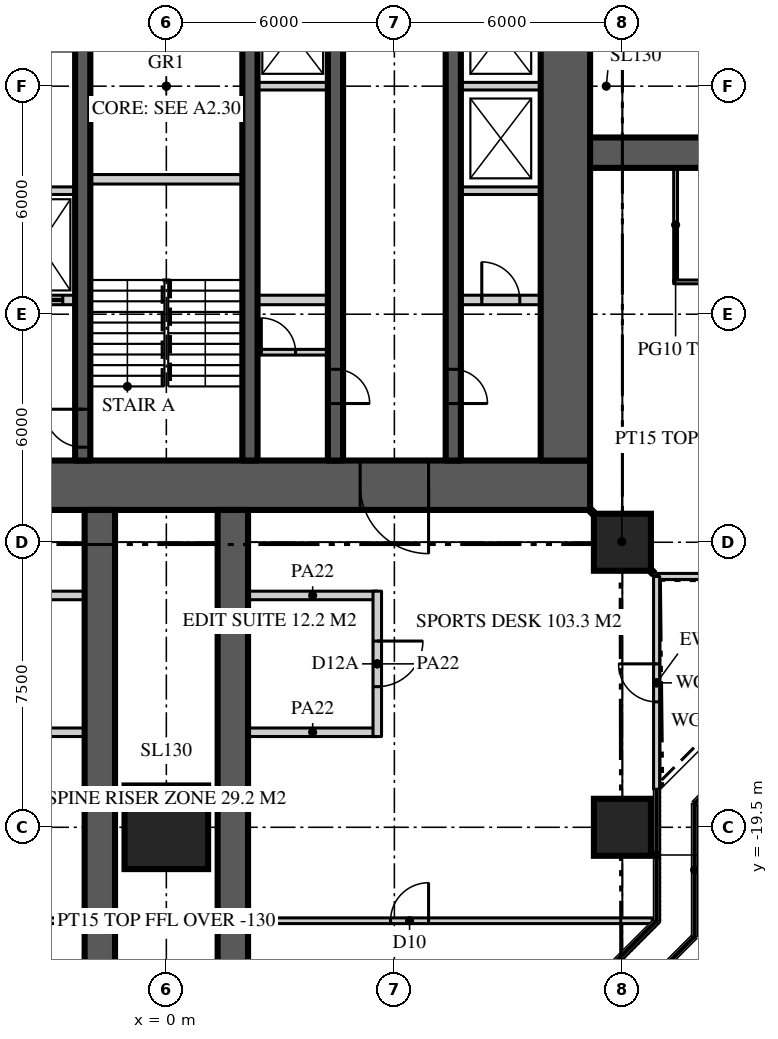
"""IFC4 building model, lengths in metres.
Left out: names, types, materials, properties, quantities, classifications, styles, units other than length and angle.
Written with IfcOpenShell. Run it as: python <this file> out.ifc"""

import sys

from ifc_helpers import new_model, si_unit, direction, frame, frame_2d, origin, origin_2d, place, context, subcontext, project, spatial, rectangle, extrude, element, fill, save


model = new_model("IFC4")
c1 = context("Model", 3, precision=1e-05, world=origin(), true_north=direction((0.0, 1.0)))
c2 = subcontext(c1, "Body", "Model", "MODEL_VIEW")
j1 = project(units=[si_unit("LENGTHUNIT", "METRE"), si_unit("PLANEANGLEUNIT", "RADIAN")], contexts=[c1])
p1 = place(None, origin())
s1 = spatial("IfcSite", under=j1, at=p1, CompositionType="ELEMENT")
p2 = place(p1, origin())
s2 = spatial("IfcBuilding", under=s1, at=p2, CompositionType="ELEMENT")
p3 = place(p2, frame((0.0, 0.0, 224.4)))
s3 = spatial("IfcBuildingStorey", under=s2, at=p3, CompositionType="ELEMENT", Elevation=224.4)
p4 = place(p3, frame((11.15, -10.5, 0.0), z_axis=(0.0, 0.0, 1.0), x_axis=(-1.0, 0.0, 0.0)))
e1 = element("IfcWall", 1, at=p4, inside=s3, PredefinedType="SHEAR", context=c2, shape_type="SweptSolid", body=[
    extrude(rectangle(XDim=22.3, YDim=1.3, at=frame_2d((11.15, 0.0))), origin(), (0.0, 0.0, 1.0), 3.9),
])
p5 = place(p4, frame((16.25, 0.0, 0.0)))
e2 = element("IfcOpeningElement", 2, at=p5, cuts=e1, PredefinedType="OPENING", context=c2, shape_type="SweptSolid", body=[
    extrude(rectangle(XDim=1.8, YDim=2.2, at=frame_2d((0.9, 1.1))), frame((0.0, 0.66, 0.0), z_axis=(0.0, -1.0, 0.0), x_axis=(1.0, 0.0, 0.0)), (0.0, 0.0, 1.0), 1.32),
])
p6 = place(p4, frame((4.25, 0.0, 0.0)))
e3 = element("IfcOpeningElement", 3, at=p6, cuts=e1, PredefinedType="OPENING", context=c2, shape_type="SweptSolid", body=[
    extrude(rectangle(XDim=1.8, YDim=2.2, at=frame_2d((0.9, 1.1))), frame((0.0, 0.66, 0.0), z_axis=(0.0, -1.0, 0.0), x_axis=(1.0, 0.0, 0.0)), (0.0, 0.0, 1.0), 1.32),
])
p7 = place(p3, frame((10.5, -9.85, 0.0), z_axis=(0.0, 0.0, 1.0), x_axis=(0.0, 1.0, 0.0)))
e4 = element("IfcWall", 4, at=p7, inside=s3, PredefinedType="SHEAR", context=c2, shape_type="SweptSolid", body=[
    extrude(rectangle(XDim=19.7, YDim=1.3, at=frame_2d((9.85, 0.0))), origin(), (0.0, 0.0, 1.0), 3.9),
])
p8 = place(p7, frame((17.25, 0.0, 0.0)))
e5 = element("IfcOpeningElement", 5, at=p8, cuts=e4, PredefinedType="OPENING", context=c2, shape_type="SweptSolid", body=[
    extrude(rectangle(XDim=1.0, YDim=2.2, at=frame_2d((0.5, 1.1))), frame((0.0, 0.66, 0.0), z_axis=(0.0, -1.0, 0.0), x_axis=(1.0, 0.0, 0.0)), (0.0, 0.0, 1.0), 1.32),
])
for number, where, z_axis, x_axis in (
    (6, (11.15, -1.75, 0.0), (0.0, 0.0, 1.0), (1.0, 0.0, 0.0)),
    (7, (-1.75, -11.15, 0.0), (0.0, 0.0, 1.0), (0.0, -1.0, 0.0)),
    (8, (1.75, -11.15, 0.0), (0.0, 0.0, 1.0), (0.0, -1.0, 0.0)),
):
    element("IfcWall", number, at=place(p3, frame(where, z_axis=z_axis, x_axis=x_axis)), inside=s3, PredefinedType="SHEAR", context=c2, shape_type="SweptSolid", body=[
        extrude(rectangle(XDim=15.25, YDim=0.8, at=frame_2d((7.625, 0.0))), origin(), (0.0, 0.0, 1.0), 3.9),
    ])
p9 = place(p3, frame((0.0, -19.5, 0.0), z_axis=(0.0, 0.0, 1.0), x_axis=(1.0, 0.0, 0.0)))
e9 = element("IfcColumn", 9, at=p9, inside=s3, PredefinedType="COLUMN", context=c2, shape_type="SweptSolid", body=[
    extrude(rectangle(XDim=2.2, YDim=2.2, at=origin_2d()), origin(), (0.0, 0.0, 1.0), 3.9),
])
for number, where, z_axis, x_axis in (
    (10, (12.0, -19.5, 0.0), (0.0, 0.0, 1.0), (1.0, 0.0, 0.0)),
    (11, (12.0, -12.0, 0.0), (0.0, 0.0, 1.0), (1.0, 0.0, 0.0)),
):
    element("IfcColumn", number, at=place(p3, frame(where, z_axis=z_axis, x_axis=x_axis)), inside=s3, PredefinedType="COLUMN", context=c2, shape_type="SweptSolid", body=[
        extrude(rectangle(XDim=1.5, YDim=1.5, at=origin_2d()), origin(), (0.0, 0.0, 1.0), 3.9),
    ])
p10 = place(p3, frame((12.9, -12.9, 0.0), z_axis=(0.0, 0.0, 1.0), x_axis=(1.0, 0.0, 0.0)))
e12 = element("IfcWall", 12, at=p10, inside=s3, PredefinedType="SOLIDWALL", context=c2, shape_type="SweptSolid", body=[
    extrude(rectangle(XDim=5.6, YDim=0.16, at=frame_2d((2.8, 0.0))), origin(), (0.0, 0.0, 1.0), 3.77),
])
p11 = place(p3, frame((12.9, -18.5, 0.0), z_axis=(0.0, 0.0, 1.0), x_axis=(0.0, 1.0, 0.0)))
e13 = element("IfcWall", 13, at=p11, inside=s3, PredefinedType="SOLIDWALL", context=c2, shape_type="SweptSolid", body=[
    extrude(rectangle(XDim=5.6, YDim=0.16, at=frame_2d((2.8, 0.0))), origin(), (0.0, 0.0, 1.0), 3.77),
])
p12 = place(p11, frame((2.3, 0.0, 0.0)))
e14 = element("IfcOpeningElement", 14, at=p12, cuts=e13, PredefinedType="OPENING", context=c2, shape_type="SweptSolid", body=[
    extrude(rectangle(XDim=1.0, YDim=2.2, at=frame_2d((0.5, 1.1))), frame((0.0, 0.09, 0.0), z_axis=(0.0, -1.0, 0.0), x_axis=(1.0, 0.0, 0.0)), (0.0, 0.0, 1.0), 0.18),
])
p13 = place(p3, frame((7.55, 9.85, 0.0), z_axis=(0.0, 0.0, 1.0), x_axis=(0.0, -1.0, 0.0)))
e15 = element("IfcWall", 15, at=p13, inside=s3, PredefinedType="SHEAR", context=c2, shape_type="SweptSolid", body=[
    extrude(rectangle(XDim=19.7, YDim=0.4, at=frame_2d((9.85, 0.0))), origin(), (0.0, 0.0, 1.0), 3.9),
])
p14 = place(p13, frame((1.45, 0.0, 0.0)))
e16 = element("IfcOpeningElement", 16, at=p14, cuts=e15, PredefinedType="OPENING", context=c2, shape_type="SweptSolid", body=[
    extrude(rectangle(XDim=1.0, YDim=2.2, at=frame_2d((0.5, 1.1))), frame((0.0, 0.21, 0.0), z_axis=(0.0, -1.0, 0.0), x_axis=(1.0, 0.0, 0.0)), (0.0, 0.0, 1.0), 0.42),
])
p15 = place(p13, frame((17.3, 0.0, 0.0)))
e17 = element("IfcOpeningElement", 17, at=p15, cuts=e15, PredefinedType="OPENING", context=c2, shape_type="SweptSolid", body=[
    extrude(rectangle(XDim=0.9, YDim=2.1, at=frame_2d((0.45, 1.05))), frame((0.0, 0.21, 0.0), z_axis=(0.0, -1.0, 0.0), x_axis=(1.0, 0.0, 0.0)), (0.0, 0.0, 1.0), 0.42),
])
p16 = place(p3, frame((4.45, 9.85, 0.0), z_axis=(0.0, 0.0, 1.0), x_axis=(0.0, -1.0, 0.0)))
e18 = element("IfcWall", 18, at=p16, inside=s3, PredefinedType="SHEAR", context=c2, shape_type="SweptSolid", body=[
    extrude(rectangle(XDim=19.7, YDim=0.4, at=frame_2d((9.85, 0.0))), origin(), (0.0, 0.0, 1.0), 3.9),
])
p17 = place(p16, frame((1.95, 0.0, 0.0)))
e19 = element("IfcOpeningElement", 19, at=p17, cuts=e18, PredefinedType="OPENING", context=c2, shape_type="SweptSolid", body=[
    extrude(rectangle(XDim=1.0, YDim=2.2, at=frame_2d((0.5, 1.1))), frame((0.0, 0.21, 0.0), z_axis=(0.0, -1.0, 0.0), x_axis=(1.0, 0.0, 0.0)), (0.0, 0.0, 1.0), 0.42),
])
p18 = place(p16, frame((17.3, 0.0, 0.0)))
e20 = element("IfcOpeningElement", 20, at=p18, cuts=e18, PredefinedType="OPENING", context=c2, shape_type="SweptSolid", body=[
    extrude(rectangle(XDim=0.9, YDim=2.1, at=frame_2d((0.45, 1.05))), frame((0.0, 0.21, 0.0), z_axis=(0.0, -1.0, 0.0), x_axis=(1.0, 0.0, 0.0)), (0.0, 0.0, 1.0), 0.42),
])
p19 = place(p3, frame((-2.2, -9.85, 0.0), z_axis=(0.0, 0.0, 1.0), x_axis=(0.0, 1.0, 0.0)))
e21 = element("IfcWall", 21, at=p19, inside=s3, PredefinedType="SHEAR", context=c2, shape_type="SweptSolid", body=[
    extrude(rectangle(XDim=19.7, YDim=0.4, at=frame_2d((9.85, 0.0))), origin(), (0.0, 0.0, 1.0), 3.9),
])
p20 = place(p19, frame((0.35, 0.0, 0.0)))
e22 = element("IfcOpeningElement", 22, at=p20, cuts=e21, PredefinedType="OPENING", context=c2, shape_type="SweptSolid", body=[
    extrude(rectangle(XDim=1.0, YDim=2.2, at=frame_2d((0.5, 1.1))), frame((0.0, 0.21, 0.0), z_axis=(0.0, -1.0, 0.0), x_axis=(1.0, 0.0, 0.0)), (0.0, 0.0, 1.0), 0.42),
])
p21 = place(p3, frame((2.2, 9.85, 0.0), z_axis=(0.0, 0.0, 1.0), x_axis=(0.0, -1.0, 0.0)))
e23 = element("IfcWall", 23, at=p21, inside=s3, PredefinedType="SHEAR", context=c2, shape_type="SweptSolid", body=[
    extrude(rectangle(XDim=19.7, YDim=0.4, at=frame_2d((9.85, 0.0))), origin(), (0.0, 0.0, 1.0), 3.9),
])
p22 = place(p21, frame((0.35, 0.0, 0.0)))
e24 = element("IfcOpeningElement", 24, at=p22, cuts=e23, PredefinedType="OPENING", context=c2, shape_type="SweptSolid", body=[
    extrude(rectangle(XDim=1.0, YDim=2.2, at=frame_2d((0.5, 1.1))), frame((0.0, 0.21, 0.0), z_axis=(0.0, -1.0, 0.0), x_axis=(1.0, 0.0, 0.0)), (0.0, 0.0, 1.0), 0.42),
])
p23 = place(p3, frame((-4.25, -5.625, 0.0), z_axis=(0.0, 0.0, 1.0), x_axis=(1.0, 0.0, 0.0)))
e25 = element("IfcWall", 25, at=p23, inside=s3, PredefinedType="SOLIDWALL", context=c2, shape_type="SweptSolid", body=[
    extrude(rectangle(XDim=1.85, YDim=0.25, at=frame_2d((0.925, 0.0))), origin(), (0.0, 0.0, 1.0), 3.7),
])
p24 = place(p23, frame((0.325, 0.0, 0.0)))
e26 = element("IfcOpeningElement", 26, at=p24, cuts=e25, PredefinedType="OPENING", context=c2, shape_type="SweptSolid", body=[
    extrude(rectangle(XDim=1.2, YDim=2.2, at=frame_2d((0.6, 1.1))), frame((0.0, 0.135, 0.0), z_axis=(0.0, -1.0, 0.0), x_axis=(1.0, 0.0, 0.0)), (0.0, 0.0, 1.0), 0.27),
])
p25 = place(p3, frame((2.4, -5.625, 0.0), z_axis=(0.0, 0.0, 1.0), x_axis=(1.0, 0.0, 0.0)))
e27 = element("IfcWall", 27, at=p25, inside=s3, PredefinedType="SOLIDWALL", context=c2, shape_type="SweptSolid", body=[
    extrude(rectangle(XDim=1.85, YDim=0.25, at=frame_2d((0.925, 0.0))), origin(), (0.0, 0.0, 1.0), 3.7),
])
p26 = place(p3, frame((7.75, -5.625, 0.0), z_axis=(0.0, 0.0, 1.0), x_axis=(1.0, 0.0, 0.0)))
e28 = element("IfcWall", 28, at=p26, inside=s3, PredefinedType="SOLIDWALL", context=c2, shape_type="SweptSolid", body=[
    extrude(rectangle(XDim=2.1, YDim=0.25, at=frame_2d((1.05, 0.0))), origin(), (0.0, 0.0, 1.0), 3.7),
])
p27 = place(p26, frame((0.55, 0.0, 0.0)))
e29 = element("IfcOpeningElement", 29, at=p27, cuts=e28, PredefinedType="OPENING", context=c2, shape_type="SweptSolid", body=[
    extrude(rectangle(XDim=1.0, YDim=2.2, at=frame_2d((0.5, 1.1))), frame((0.0, 0.135, 0.0), z_axis=(0.0, -1.0, 0.0), x_axis=(1.0, 0.0, 0.0)), (0.0, 0.0, 1.0), 0.27),
])
p28 = place(p3, frame((-2.0, -2.45, 0.0), z_axis=(0.0, 0.0, 1.0), x_axis=(1.0, 0.0, 0.0)))
e30 = element("IfcWall", 30, at=p28, inside=s3, PredefinedType="SOLIDWALL", context=c2, shape_type="SweptSolid", body=[
    extrude(rectangle(XDim=4.0, YDim=0.25, at=frame_2d((2.0, 0.0))), origin(), (0.0, 0.0, 1.0), 3.7),
])
p29 = place(p3, frame((-4.25, -2.75, 0.0), z_axis=(0.0, 0.0, 1.0), x_axis=(1.0, 0.0, 0.0)))
e31 = element("IfcWall", 31, at=p29, inside=s3, PredefinedType="SOLIDWALL", context=c2, shape_type="SweptSolid", body=[
    extrude(rectangle(XDim=1.85, YDim=0.2, at=frame_2d((0.925, 0.0))), origin(), (0.0, 0.0, 1.0), 3.7),
])
p30 = place(p3, frame((7.75, -2.75, 0.0), z_axis=(0.0, 0.0, 1.0), x_axis=(1.0, 0.0, 0.0)))
e32 = element("IfcWall", 32, at=p30, inside=s3, PredefinedType="SOLIDWALL", context=c2, shape_type="SweptSolid", body=[
    extrude(rectangle(XDim=2.1, YDim=0.2, at=frame_2d((1.05, 0.0))), origin(), (0.0, 0.0, 1.0), 3.7),
])
p31 = place(p3, frame((2.4, 0.0, 0.0), z_axis=(0.0, 0.0, 1.0), x_axis=(1.0, 0.0, 0.0)))
e33 = element("IfcWall", 33, at=p31, inside=s3, PredefinedType="SOLIDWALL", context=c2, shape_type="SweptSolid", body=[
    extrude(rectangle(XDim=1.85, YDim=0.2, at=frame_2d((0.925, 0.0))), origin(), (0.0, 0.0, 1.0), 3.7),
])
p32 = place(p3, frame((7.75, 0.0, 0.0), z_axis=(0.0, 0.0, 1.0), x_axis=(1.0, 0.0, 0.0)))
e34 = element("IfcWall", 34, at=p32, inside=s3, PredefinedType="SOLIDWALL", context=c2, shape_type="SweptSolid", body=[
    extrude(rectangle(XDim=2.1, YDim=0.2, at=frame_2d((1.05, 0.0))), origin(), (0.0, 0.0, 1.0), 3.7),
])
p33 = place(p3, frame((13.4, -2.15, 0.0), z_axis=(0.0, 0.0, 1.0), x_axis=(0.0, -1.0, 0.0)))
e35 = element("IfcWall", 35, at=p33, inside=s3, PredefinedType="PARTITIONING", context=c2, shape_type="SweptSolid", body=[
    extrude(rectangle(XDim=3.0, YDim=0.1, at=frame_2d((1.5, 0.0))), origin(), (0.0, 0.0, 1.0), 3.77),
])
p34 = place(p3, frame((13.35, -5.15, 0.0), z_axis=(0.0, 0.0, 1.0), x_axis=(1.0, 0.0, 0.0)))
e36 = element("IfcWall", 36, at=p34, inside=s3, PredefinedType="PARTITIONING", context=c2, shape_type="SweptSolid", body=[
    extrude(rectangle(XDim=3.1, YDim=0.1, at=frame_2d((1.55, 0.0))), origin(), (0.0, 0.0, 1.0), 3.77),
])
p35 = place(p34, frame((1.05, 0.0, 0.0)))
e37 = element("IfcOpeningElement", 37, at=p35, cuts=e36, PredefinedType="OPENING", context=c2, shape_type="SweptSolid", body=[
    extrude(rectangle(XDim=1.0, YDim=2.2, at=frame_2d((0.5, 1.1))), frame((0.0, 0.06, 0.0), z_axis=(0.0, -1.0, 0.0), x_axis=(1.0, 0.0, 0.0)), (0.0, 0.0, 1.0), 0.12),
])
p36 = place(p3, frame((-12.786, -21.959, 0.0), z_axis=(0.0, 0.0, 1.0), x_axis=(1.0, 0.0, 0.0)))
e38 = element("IfcWall", 38, at=p36, inside=s3, PredefinedType="PARTITIONING", context=c2, shape_type="SweptSolid", body=[
    extrude(rectangle(XDim=25.573, YDim=0.15, at=frame_2d((12.786, 0.0))), origin(), (0.0, 0.0, 1.0), 3.77),
])
p37 = place(p36, frame((18.687, 0.0, 0.0)))
e39 = element("IfcOpeningElement", 39, at=p37, cuts=e38, PredefinedType="OPENING", context=c2, shape_type="SweptSolid", body=[
    extrude(rectangle(XDim=1.0, YDim=2.2, at=frame_2d((0.5, 1.1))), frame((0.0, 0.085, 0.0), z_axis=(0.0, -1.0, 0.0), x_axis=(1.0, 0.0, 0.0)), (0.0, 0.0, 1.0), 0.17),
])
p38 = place(p36, frame((5.886, 0.0, 0.0)))
e40 = element("IfcOpeningElement", 40, at=p38, cuts=e38, PredefinedType="OPENING", context=c2, shape_type="SweptSolid", body=[
    extrude(rectangle(XDim=1.0, YDim=2.2, at=frame_2d((0.5, 1.1))), frame((0.0, 0.085, 0.0), z_axis=(0.0, -1.0, 0.0), x_axis=(1.0, 0.0, 0.0)), (0.0, 0.0, 1.0), 0.17),
])
for number, where, z_axis, x_axis in (
    (41, (2.15, -13.4, 0.0), (0.0, 0.0, 1.0), (1.0, 0.0, 0.0)),
    (42, (2.15, -17.0, 0.0), (0.0, 0.0, 1.0), (1.0, 0.0, 0.0)),
):
    element("IfcWall", number, at=place(p3, frame(where, z_axis=z_axis, x_axis=x_axis)), inside=s3, PredefinedType="PARTITIONING", context=c2, shape_type="SweptSolid", body=[
        extrude(rectangle(XDim=3.4, YDim=0.225, at=frame_2d((1.7, 0.0))), origin(), (0.0, 0.0, 1.0), 3.77),
    ])
p39 = place(p3, frame((5.55, -13.288, 0.0), z_axis=(0.0, 0.0, 1.0), x_axis=(0.0, -1.0, 0.0)))
e43 = element("IfcWall", 43, at=p39, inside=s3, PredefinedType="PARTITIONING", context=c2, shape_type="SweptSolid", body=[
    extrude(rectangle(XDim=3.825, YDim=0.225, at=frame_2d((1.913, 0.0))), origin(), (0.0, 0.0, 1.0), 3.77),
])
p40 = place(p39, frame((1.312, 0.0, 0.0)))
e44 = element("IfcOpeningElement", 44, at=p40, cuts=e43, PredefinedType="OPENING", context=c2, shape_type="SweptSolid", body=[
    extrude(rectangle(XDim=1.2, YDim=2.2, at=frame_2d((0.6, 1.1))), frame((0.0, 0.123, 0.0), z_axis=(0.0, -1.0, 0.0), x_axis=(1.0, 0.0, 0.0)), (0.0, 0.0, 1.0), 0.245),
])
for number, where, z_axis, x_axis in (
    (45, (-2.15, -13.4, 0.0), (0.0, 0.0, 1.0), (-1.0, 0.0, 0.0)),
    (46, (-2.15, -17.0, 0.0), (0.0, 0.0, 1.0), (-1.0, 0.0, 0.0)),
):
    element("IfcWall", number, at=place(p3, frame(where, z_axis=z_axis, x_axis=x_axis)), inside=s3, PredefinedType="PARTITIONING", context=c2, shape_type="SweptSolid", body=[
        extrude(rectangle(XDim=3.4, YDim=0.225, at=frame_2d((1.7, 0.0))), origin(), (0.0, 0.0, 1.0), 3.77),
    ])
p41 = place(p3, frame((11.15, -11.15, 0.0), z_axis=(0.0, 0.0, 1.0), x_axis=(0.707106781187, -0.707106781187, 0.0)))
e47 = element("IfcWall", 47, at=p41, inside=s3, PredefinedType="PARTITIONING", context=c2, shape_type="SweptSolid", body=[
    extrude(rectangle(XDim=2.362, YDim=0.15, at=frame_2d((1.181, 0.0))), origin(), (0.0, 0.0, 1.0), 3.22),
])
p42 = place(p3, frame((2.4, -7.0, 0.0), z_axis=(0.0, 0.0, 1.0), x_axis=(1.0, 0.0, 0.0)))
e48 = element("IfcWall", 48, at=p42, inside=s3, PredefinedType="SOLIDWALL", context=c2, shape_type="SweptSolid", body=[
    extrude(rectangle(XDim=1.85, YDim=0.15, at=frame_2d((0.925, 0.0))), origin(), (0.0, 0.0, 1.0), 3.77),
])
p43 = place(p42, frame((0.1, 0.0, 0.0)))
e49 = element("IfcOpeningElement", 49, at=p43, cuts=e48, PredefinedType="OPENING", context=c2, shape_type="SweptSolid", body=[
    extrude(rectangle(XDim=0.9, YDim=2.1, at=frame_2d((0.45, 1.05))), frame((0.0, 0.085, 0.0), z_axis=(0.0, -1.0, 0.0), x_axis=(1.0, 0.0, 0.0)), (0.0, 0.0, 1.0), 0.17),
])
p44 = place(p12, origin())
e50 = element("IfcDoor", 50, at=p44, inside=s3, OperationType="SINGLE_SWING_RIGHT", PredefinedType="DOOR", context=c2, shape_type="SweptSolid", body=[
    extrude(rectangle(XDim=1.0, YDim=2.2, at=frame_2d((0.5, 1.1))), frame((0.0, 0.025, 0.0), z_axis=(0.0, -1.0, 0.0), x_axis=(1.0, 0.0, 0.0)), (0.0, 0.0, 1.0), 0.05),
])
fill(e14, e50)
p45 = place(p6, origin())
e51 = element("IfcDoor", 51, at=p45, inside=s3, OperationType="DOUBLE_DOOR_DOUBLE_SWING", PredefinedType="DOOR", context=c2, shape_type="SweptSolid", body=[
    extrude(rectangle(XDim=1.8, YDim=2.2, at=frame_2d((0.9, 1.1))), frame((0.0, 0.025, 0.0), z_axis=(0.0, -1.0, 0.0), x_axis=(1.0, 0.0, 0.0)), (0.0, 0.0, 1.0), 0.05),
])
fill(e3, e51)
p46 = place(p20, origin())
e52 = element("IfcDoor", 52, at=p46, inside=s3, OperationType="SINGLE_SWING_RIGHT", PredefinedType="DOOR", context=c2, shape_type="SweptSolid", body=[
    extrude(rectangle(XDim=1.0, YDim=2.2, at=frame_2d((0.5, 1.1))), frame((0.0, 0.025, 0.0), z_axis=(0.0, -1.0, 0.0), x_axis=(1.0, 0.0, 0.0)), (0.0, 0.0, 1.0), 0.05),
])
fill(e22, e52)
p47 = place(p15, origin())
e53 = element("IfcDoor", 53, at=p47, inside=s3, OperationType="SINGLE_SWING_RIGHT", PredefinedType="DOOR", context=c2, shape_type="SweptSolid", body=[
    extrude(rectangle(XDim=0.9, YDim=2.1, at=frame_2d((0.45, 1.05))), frame((0.0, 0.025, 0.0), z_axis=(0.0, -1.0, 0.0), x_axis=(1.0, 0.0, 0.0)), (0.0, 0.0, 1.0), 0.05),
])
fill(e17, e53)
p48 = place(p18, origin())
e54 = element("IfcDoor", 54, at=p48, inside=s3, OperationType="SINGLE_SWING_RIGHT", PredefinedType="DOOR", context=c2, shape_type="SweptSolid", body=[
    extrude(rectangle(XDim=0.9, YDim=2.1, at=frame_2d((0.45, 1.05))), frame((0.0, 0.025, 0.0), z_axis=(0.0, -1.0, 0.0), x_axis=(1.0, 0.0, 0.0)), (0.0, 0.0, 1.0), 0.05),
])
fill(e20, e54)
p49 = place(p24, origin())
e55 = element("IfcDoor", 55, at=p49, inside=s3, OperationType="SLIDING_TO_LEFT", PredefinedType="DOOR", context=c2, shape_type="SweptSolid", body=[
    extrude(rectangle(XDim=1.2, YDim=2.2, at=frame_2d((0.6, 1.1))), frame((0.0, 0.025, 0.0), z_axis=(0.0, -1.0, 0.0), x_axis=(1.0, 0.0, 0.0)), (0.0, 0.0, 1.0), 0.05),
])
fill(e26, e55)
p50 = place(p37, origin())
e56 = element("IfcDoor", 56, at=p50, inside=s3, OperationType="SINGLE_SWING_RIGHT", PredefinedType="DOOR", context=c2, shape_type="SweptSolid", body=[
    extrude(rectangle(XDim=1.0, YDim=2.2, at=frame_2d((0.5, 1.1))), frame((0.0, 0.025, 0.0), z_axis=(0.0, -1.0, 0.0), x_axis=(1.0, 0.0, 0.0)), (0.0, 0.0, 1.0), 0.05),
])
fill(e39, e56)
p51 = place(p40, origin())
e57 = element("IfcDoor", 57, at=p51, inside=s3, OperationType="SINGLE_SWING_LEFT", PredefinedType="DOOR", context=c2, shape_type="SweptSolid", body=[
    extrude(rectangle(XDim=1.2, YDim=2.2, at=frame_2d((0.6, 1.1))), frame((0.0, 0.025, 0.0), z_axis=(0.0, -1.0, 0.0), x_axis=(1.0, 0.0, 0.0)), (0.0, 0.0, 1.0), 0.05),
])
fill(e44, e57)
p52 = place(p27, origin())
e58 = element("IfcDoor", 58, at=p52, inside=s3, OperationType="SINGLE_SWING_LEFT", PredefinedType="DOOR", context=c2, shape_type="SweptSolid", body=[
    extrude(rectangle(XDim=1.0, YDim=2.2, at=frame_2d((0.5, 1.1))), frame((0.0, 0.025, 0.0), z_axis=(0.0, -1.0, 0.0), x_axis=(1.0, 0.0, 0.0)), (0.0, 0.0, 1.0), 0.05),
])
fill(e29, e58)
p53 = place(p43, origin())
e59 = element("IfcDoor", 59, at=p53, inside=s3, OperationType="SINGLE_SWING_LEFT", PredefinedType="DOOR", context=c2, shape_type="SweptSolid", body=[
    extrude(rectangle(XDim=0.9, YDim=2.1, at=frame_2d((0.45, 1.05))), frame((0.0, 0.025, 0.0), z_axis=(0.0, -1.0, 0.0), x_axis=(1.0, 0.0, 0.0)), (0.0, 0.0, 1.0), 0.05),
])
fill(e49, e59)
save(model, sys.argv[1])
